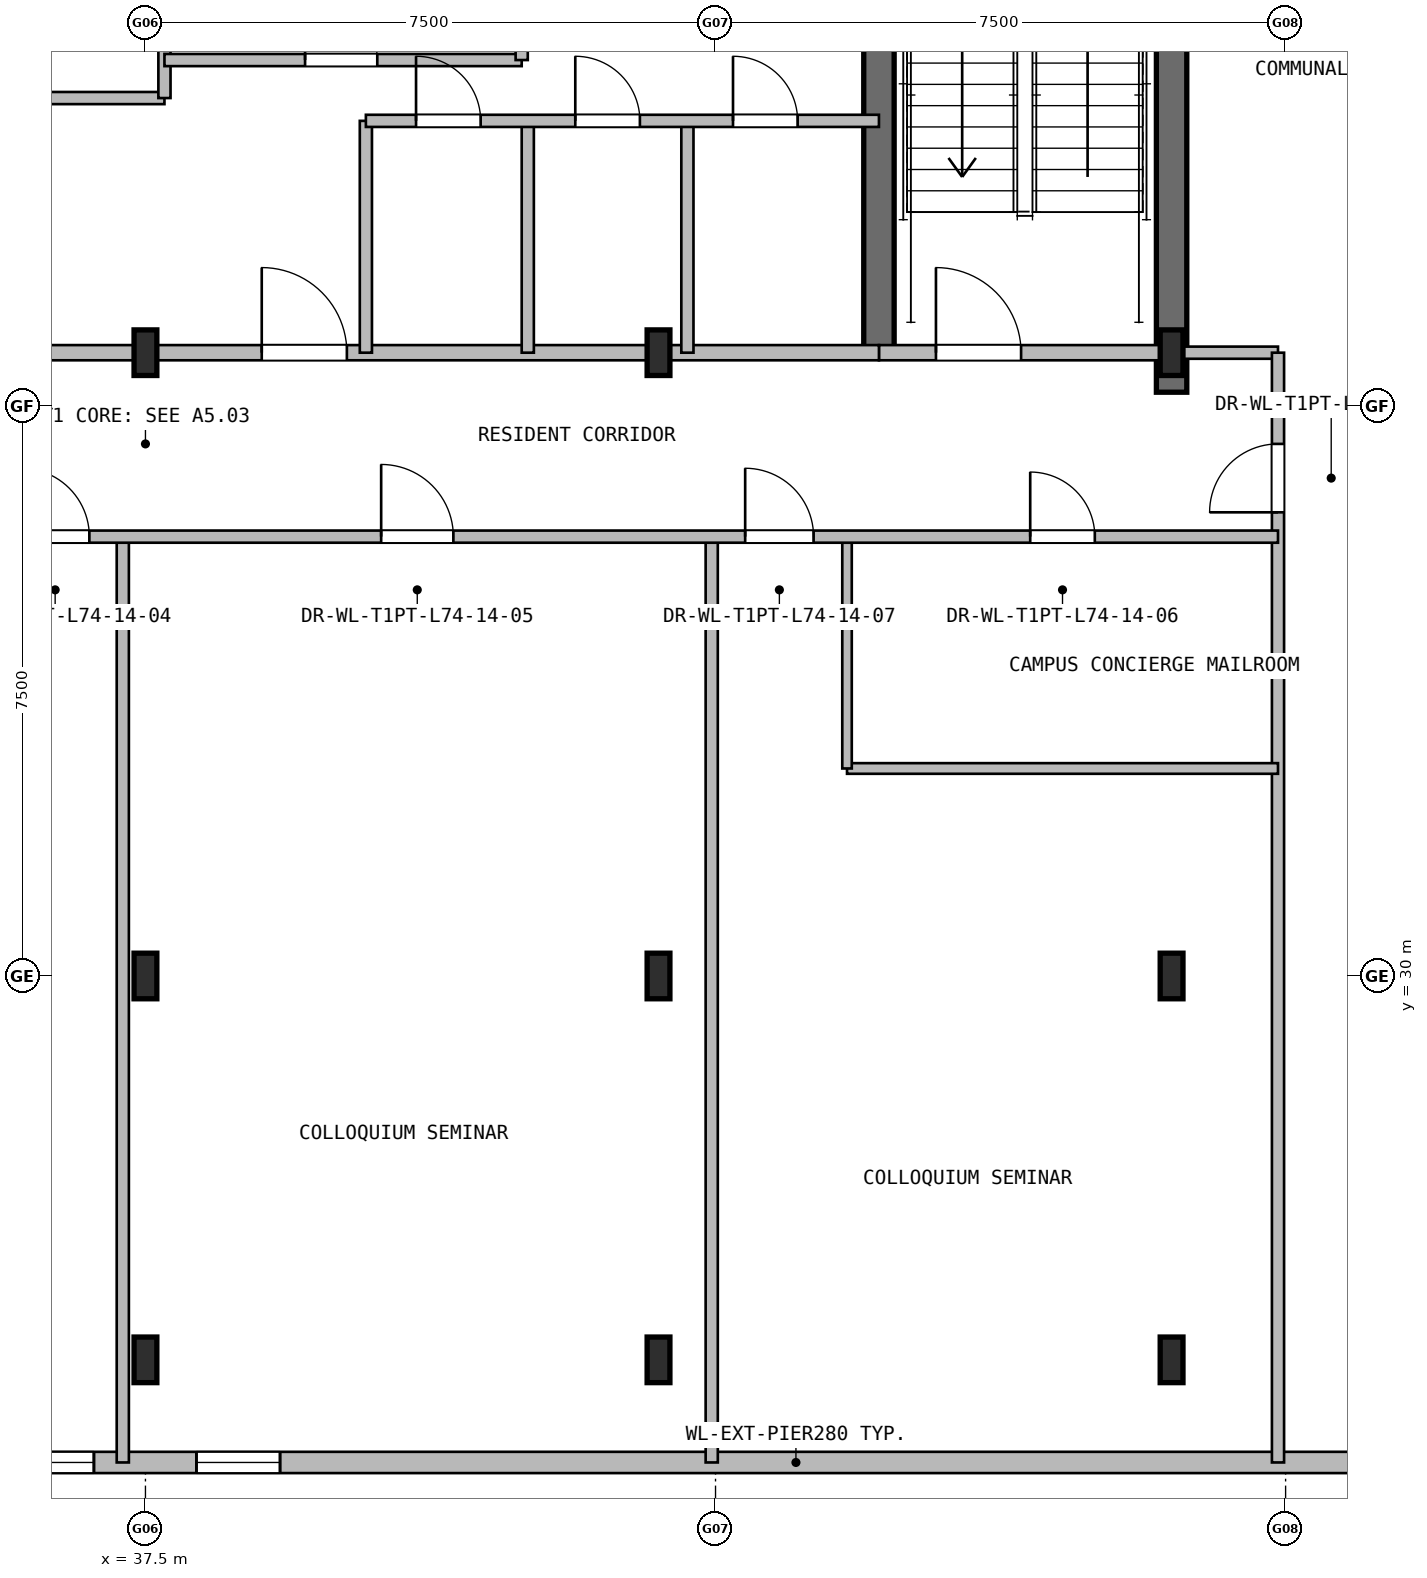
"""IFC4 building model, lengths in metres.
Left out: names, types, materials, properties, quantities, classifications, styles, units other than length and angle.
Written with IfcOpenShell. Run it as: python <this file> out.ifc"""

import sys

from ifc_helpers import new_model, si_unit, direction, frame, frame_2d, origin, origin_2d, place, context, subcontext, project, spatial, rectangle, i_section, extrude, element, fill, save


model = new_model("IFC4")
c1 = context("Model", 3, precision=1e-05, world=origin(), true_north=direction((0.0, 1.0)))
c2 = subcontext(c1, "Body", "Model", "MODEL_VIEW")
j1 = project(units=[si_unit("LENGTHUNIT", "METRE"), si_unit("PLANEANGLEUNIT", "RADIAN")], contexts=[c1])
p1 = place(None, origin())
s1 = spatial("IfcSite", under=j1, at=p1, CompositionType="ELEMENT")
p2 = place(p1, origin())
s2 = spatial("IfcBuilding", under=s1, at=p2, CompositionType="ELEMENT")
p3 = place(p2, frame((0.0, 0.0, 265.8)))
s3 = spatial("IfcBuildingStorey", under=s2, at=p3, CompositionType="ELEMENT", Elevation=265.8)
p4 = place(p3, frame((51.0, 37.68, 0.0), z_axis=(0.0, 0.0, 1.0), x_axis=(0.0, 1.0, 0.0)))
e1 = element("IfcWall", 1, at=p4, inside=s3, PredefinedType="SHEAR", context=c2, shape_type="SweptSolid", body=[
    extrude(rectangle(XDim=10.32, YDim=0.4, at=frame_2d((5.16, 0.0))), origin(), (0.0, 0.0, 1.0), 4.2),
])
p5 = place(p3, frame((47.15, 38.2, 0.0), z_axis=(0.0, 0.0, 1.0), x_axis=(0.0, 1.0, 0.0)))
e2 = element("IfcWall", 2, at=p5, inside=s3, PredefinedType="SHEAR", context=c2, shape_type="SweptSolid", body=[
    extrude(rectangle(XDim=9.8, YDim=0.4, at=frame_2d((4.9, 0.0))), origin(), (0.0, 0.0, 1.0), 4.2),
])
for number, where, z_axis, x_axis in (
    (3, (37.5, 24.95, 0.0), (0.0, 0.0, 1.0), (1.0, 0.0, 0.0)),
    (4, (37.5, 30.0, 0.0), (0.0, 0.0, 1.0), (1.0, 0.0, 0.0)),
    (5, (37.5, 38.2, 0.0), (0.0, 0.0, 1.0), (1.0, 0.0, 0.0)),
    (6, (44.25, 24.95, 0.0), (0.0, 0.0, 1.0), (1.0, 0.0, 0.0)),
    (7, (44.25, 30.0, 0.0), (0.0, 0.0, 1.0), (1.0, 0.0, 0.0)),
    (8, (44.25, 38.2, 0.0), (0.0, 0.0, 1.0), (1.0, 0.0, 0.0)),
    (9, (51.0, 24.95, 0.0), (0.0, 0.0, 1.0), (1.0, 0.0, 0.0)),
    (10, (51.0, 30.0, 0.0), (0.0, 0.0, 1.0), (1.0, 0.0, 0.0)),
    (11, (51.0, 38.2, 0.0), (0.0, 0.0, 1.0), (1.0, 0.0, 0.0)),
):
    element("IfcColumn", number, at=place(p3, frame(where, z_axis=z_axis, x_axis=x_axis)), inside=s3, PredefinedType="COLUMN", context=c2, shape_type="SweptSolid", body=[
        extrude(i_section(OverallWidth=0.3, OverallDepth=0.6, WebThickness=0.014, FlangeThickness=0.025, at=origin_2d()), origin(), (0.0, 0.0, 1.0), 4.2),
    ])
p6 = place(p3, frame((54.55, 23.6, 0.0), z_axis=(0.0, 0.0, 1.0), x_axis=(-1.0, 0.0, 0.0)))
e12 = element("IfcWall", 12, at=p6, inside=s3, PredefinedType="SOLIDWALL", context=c2, shape_type="SweptSolid", body=[
    extrude(rectangle(XDim=34.1, YDim=0.28, at=frame_2d((17.05, 0.0))), origin(), (0.0, 0.0, 1.0), 3.93),
])
p7 = place(p6, frame((17.728, 0.0, 0.8)))
e13 = element("IfcOpeningElement", 13, at=p7, cuts=e12, PredefinedType="OPENING", context=c2, shape_type="SweptSolid", body=[
    extrude(rectangle(XDim=1.1, YDim=1.5, at=frame_2d((0.55, 0.75))), frame((0.0, 0.15, 0.0), z_axis=(0.0, -1.0, 0.0), x_axis=(1.0, 0.0, 0.0)), (0.0, 0.0, 1.0), 0.3),
])
p8 = place(p6, frame((15.279, 0.0, 0.8)))
e14 = element("IfcOpeningElement", 14, at=p8, cuts=e12, PredefinedType="OPENING", context=c2, shape_type="SweptSolid", body=[
    extrude(rectangle(XDim=1.1, YDim=1.5, at=frame_2d((0.55, 0.75))), frame((0.0, 0.15, 0.0), z_axis=(0.0, -1.0, 0.0), x_axis=(1.0, 0.0, 0.0)), (0.0, 0.0, 1.0), 0.3),
])
p9 = place(p3, frame((47.15, 38.2, 0.0), z_axis=(0.0, 0.0, 1.0), x_axis=(1.0, 0.0, 0.0)))
e15 = element("IfcWall", 15, at=p9, inside=s3, PredefinedType="PARTITIONING", context=c2, shape_type="SweptSolid", body=[
    extrude(rectangle(XDim=3.85, YDim=0.2, at=frame_2d((1.925, 0.0))), origin(), (0.0, 0.0, 1.0), 3.33),
])
p10 = place(p9, frame((0.75, 0.0, 0.0)))
e16 = element("IfcOpeningElement", 16, at=p10, cuts=e15, PredefinedType="OPENING", context=c2, shape_type="SweptSolid", body=[
    extrude(rectangle(XDim=1.12, YDim=2.1, at=frame_2d((0.56, 1.05))), frame((0.0, 0.11, 0.0), z_axis=(0.0, -1.0, 0.0), x_axis=(1.0, 0.0, 0.0)), (0.0, 0.0, 1.0), 0.22),
])
p11 = place(p3, frame((30.8, 38.2, 0.0), z_axis=(0.0, 0.0, 1.0), x_axis=(1.0, 0.0, 0.0)))
e17 = element("IfcWall", 17, at=p11, inside=s3, PredefinedType="PARTITIONING", context=c2, shape_type="SweptSolid", body=[
    extrude(rectangle(XDim=16.35, YDim=0.2, at=frame_2d((8.175, 0.0))), origin(), (0.0, 0.0, 1.0), 3.33),
])
p12 = place(p11, frame((2.95, 0.0, 0.0)))
e18 = element("IfcOpeningElement", 18, at=p12, cuts=e17, PredefinedType="OPENING", context=c2, shape_type="SweptSolid", body=[
    extrude(rectangle(XDim=1.12, YDim=2.1, at=frame_2d((0.56, 1.05))), frame((0.0, 0.11, 0.0), z_axis=(0.0, -1.0, 0.0), x_axis=(1.0, 0.0, 0.0)), (0.0, 0.0, 1.0), 0.22),
])
p13 = place(p11, frame((8.23, 0.0, 0.0)))
e19 = element("IfcOpeningElement", 19, at=p13, cuts=e17, PredefinedType="OPENING", context=c2, shape_type="SweptSolid", body=[
    extrude(rectangle(XDim=1.12, YDim=2.1, at=frame_2d((0.56, 1.05))), frame((0.0, 0.11, 0.0), z_axis=(0.0, -1.0, 0.0), x_axis=(1.0, 0.0, 0.0)), (0.0, 0.0, 1.0), 0.22),
])
p14 = place(p3, frame((30.8, 41.55, 0.0), z_axis=(0.0, 0.0, 1.0), x_axis=(1.0, 0.0, 0.0)))
e20 = element("IfcWall", 20, at=p14, inside=s3, PredefinedType="PARTITIONING", context=c2, shape_type="SweptSolid", body=[
    extrude(rectangle(XDim=6.95, YDim=0.16, at=frame_2d((3.475, 0.0))), origin(), (0.0, 0.0, 1.0), 3.93),
])
p15 = place(p14, frame((4.2, 0.0, 0.0)))
e21 = element("IfcOpeningElement", 21, at=p15, cuts=e20, PredefinedType="OPENING", context=c2, shape_type="SweptSolid", body=[
    extrude(rectangle(XDim=0.95, YDim=2.1, at=frame_2d((0.475, 1.05))), frame((0.0, 0.09, 0.0), z_axis=(0.0, -1.0, 0.0), x_axis=(1.0, 0.0, 0.0)), (0.0, 0.0, 1.0), 0.18),
])
p16 = place(p3, frame((37.75, 41.55, 0.0), z_axis=(0.0, 0.0, 1.0), x_axis=(0.0, 1.0, 0.0)))
e22 = element("IfcWall", 22, at=p16, inside=s3, PredefinedType="PARTITIONING", context=c2, shape_type="SweptSolid", body=[
    extrude(rectangle(XDim=6.35, YDim=0.16, at=frame_2d((3.175, 0.0))), origin(), (0.0, 0.0, 1.0), 3.93),
])
p17 = place(p3, frame((37.75, 42.05, 0.0), z_axis=(0.0, 0.0, 1.0), x_axis=(1.0, 0.0, 0.0)))
e23 = element("IfcWall", 23, at=p17, inside=s3, PredefinedType="PARTITIONING", context=c2, shape_type="SweptSolid", body=[
    extrude(rectangle(XDim=4.7, YDim=0.16, at=frame_2d((2.35, 0.0))), origin(), (0.0, 0.0, 1.0), 3.93),
])
p18 = place(p17, frame((1.85, 0.0, 0.0)))
e24 = element("IfcOpeningElement", 24, at=p18, cuts=e23, PredefinedType="OPENING", context=c2, shape_type="SweptSolid", body=[
    extrude(rectangle(XDim=0.95, YDim=2.1, at=frame_2d((0.475, 1.05))), frame((0.0, 0.09, 0.0), z_axis=(0.0, -1.0, 0.0), x_axis=(1.0, 0.0, 0.0)), (0.0, 0.0, 1.0), 0.18),
])
p19 = place(p3, frame((42.45, 42.05, 0.0), z_axis=(0.0, 0.0, 1.0), x_axis=(0.0, 1.0, 0.0)))
e25 = element("IfcWall", 25, at=p19, inside=s3, PredefinedType="PARTITIONING", context=c2, shape_type="SweptSolid", body=[
    extrude(rectangle(XDim=2.7, YDim=0.16, at=frame_2d((1.35, 0.0))), origin(), (0.0, 0.0, 1.0), 3.93),
])
for number, where, z_axis, x_axis in (
    (26, (40.4, 38.2, 0.0), (0.0, 0.0, 1.0), (0.0, 1.0, 0.0)),
    (27, (42.53, 38.2, 0.0), (0.0, 0.0, 1.0), (0.0, 1.0, 0.0)),
    (28, (44.63, 38.2, 0.0), (0.0, 0.0, 1.0), (0.0, 1.0, 0.0)),
):
    element("IfcWall", number, at=place(p3, frame(where, z_axis=z_axis, x_axis=x_axis)), inside=s3, PredefinedType="PARTITIONING", context=c2, shape_type="SweptSolid", body=[
        extrude(rectangle(XDim=3.05, YDim=0.16, at=frame_2d((1.525, 0.0))), origin(), (0.0, 0.0, 1.0), 3.93),
    ])
p20 = place(p3, frame((40.4, 41.25, 0.0), z_axis=(0.0, 0.0, 1.0), x_axis=(1.0, 0.0, 0.0)))
e29 = element("IfcWall", 29, at=p20, inside=s3, PredefinedType="PARTITIONING", context=c2, shape_type="SweptSolid", body=[
    extrude(rectangle(XDim=6.75, YDim=0.16, at=frame_2d((3.375, 0.0))), origin(), (0.0, 0.0, 1.0), 3.93),
])
p21 = place(p20, frame((0.66, 0.0, 0.0)))
e30 = element("IfcOpeningElement", 30, at=p21, cuts=e29, PredefinedType="OPENING", context=c2, shape_type="SweptSolid", body=[
    extrude(rectangle(XDim=0.85, YDim=2.05, at=frame_2d((0.425, 1.025))), frame((0.0, 0.09, 0.0), z_axis=(0.0, -1.0, 0.0), x_axis=(1.0, 0.0, 0.0)), (0.0, 0.0, 1.0), 0.18),
])
p22 = place(p20, frame((2.755, 0.0, 0.0)))
e31 = element("IfcOpeningElement", 31, at=p22, cuts=e29, PredefinedType="OPENING", context=c2, shape_type="SweptSolid", body=[
    extrude(rectangle(XDim=0.85, YDim=2.05, at=frame_2d((0.425, 1.025))), frame((0.0, 0.09, 0.0), z_axis=(0.0, -1.0, 0.0), x_axis=(1.0, 0.0, 0.0)), (0.0, 0.0, 1.0), 0.18),
])
p23 = place(p20, frame((4.83, 0.0, 0.0)))
e32 = element("IfcOpeningElement", 32, at=p23, cuts=e29, PredefinedType="OPENING", context=c2, shape_type="SweptSolid", body=[
    extrude(rectangle(XDim=0.85, YDim=2.05, at=frame_2d((0.425, 1.025))), frame((0.0, 0.09, 0.0), z_axis=(0.0, -1.0, 0.0), x_axis=(1.0, 0.0, 0.0)), (0.0, 0.0, 1.0), 0.18),
])
p24 = place(p3, frame((51.0, 38.2, 0.0), z_axis=(0.0, 0.0, 1.0), x_axis=(1.0, 0.0, 0.0)))
e33 = element("IfcWall", 33, at=p24, inside=s3, PredefinedType="PARTITIONING", context=c2, shape_type="SweptSolid", body=[
    extrude(rectangle(XDim=1.4, YDim=0.16, at=frame_2d((0.7, 0.0))), origin(), (0.0, 0.0, 1.0), 3.33),
])
p25 = place(p3, frame((52.4, 23.6, 0.0), z_axis=(0.0, 0.0, 1.0), x_axis=(0.0, 1.0, 0.0)))
e34 = element("IfcWall", 34, at=p25, inside=s3, PredefinedType="PARTITIONING", context=c2, shape_type="SweptSolid", body=[
    extrude(rectangle(XDim=14.6, YDim=0.16, at=frame_2d((7.3, 0.0))), origin(), (0.0, 0.0, 1.0), 3.93),
])
p26 = place(p25, frame((12.5, 0.0, 0.0)))
e35 = element("IfcOpeningElement", 35, at=p26, cuts=e34, PredefinedType="OPENING", context=c2, shape_type="SweptSolid", body=[
    extrude(rectangle(XDim=0.9, YDim=2.05, at=frame_2d((0.45, 1.025))), frame((0.0, 0.09, 0.0), z_axis=(0.0, -1.0, 0.0), x_axis=(1.0, 0.0, 0.0)), (0.0, 0.0, 1.0), 0.18),
])
for number, where, z_axis, x_axis in (
    (36, (37.202, 23.6, 0.0), (0.0, 0.0, 1.0), (0.0, 1.0, 0.0)),
    (37, (44.95, 23.6, 0.0), (0.0, 0.0, 1.0), (0.0, 1.0, 0.0)),
):
    element("IfcWall", number, at=place(p3, frame(where, z_axis=z_axis, x_axis=x_axis)), inside=s3, PredefinedType="PARTITIONING", context=c2, shape_type="SweptSolid", body=[
        extrude(rectangle(XDim=12.18, YDim=0.16, at=frame_2d((6.09, 0.0))), origin(), (0.0, 0.0, 1.0), 3.93),
    ])
p27 = place(p3, frame((46.73, 32.73, 0.0), z_axis=(0.0, 0.0, 1.0), x_axis=(1.0, 0.0, 0.0)))
e38 = element("IfcWall", 38, at=p27, inside=s3, PredefinedType="PARTITIONING", context=c2, shape_type="SweptSolid", body=[
    extrude(rectangle(XDim=5.67, YDim=0.14, at=frame_2d((2.835, 0.0))), origin(), (0.0, 0.0, 1.0), 3.93),
])
p28 = place(p3, frame((46.73, 32.73, 0.0), z_axis=(0.0, 0.0, 1.0), x_axis=(0.0, 1.0, 0.0)))
e39 = element("IfcWall", 39, at=p28, inside=s3, PredefinedType="PARTITIONING", context=c2, shape_type="SweptSolid", body=[
    extrude(rectangle(XDim=3.05, YDim=0.125, at=frame_2d((1.525, 0.0))), origin(), (0.0, 0.0, 1.0), 3.93),
])
p29 = place(p3, frame((22.6, 35.78, 0.0), z_axis=(0.0, 0.0, 1.0), x_axis=(1.0, 0.0, 0.0)))
e40 = element("IfcWall", 40, at=p29, inside=s3, PredefinedType="PARTITIONING", context=c2, shape_type="SweptSolid", body=[
    extrude(rectangle(XDim=29.8, YDim=0.16, at=frame_2d((14.9, 0.0))), origin(), (0.0, 0.0, 1.0), 3.93),
])
p30 = place(p29, frame((0.8, 0.0, 0.0)))
e41 = element("IfcOpeningElement", 41, at=p30, cuts=e40, PredefinedType="OPENING", context=c2, shape_type="SweptSolid", body=[
    extrude(rectangle(XDim=0.85, YDim=2.05, at=frame_2d((0.425, 1.025))), frame((0.0, 0.09, 0.0), z_axis=(0.0, -1.0, 0.0), x_axis=(1.0, 0.0, 0.0)), (0.0, 0.0, 1.0), 0.18),
])
p31 = place(p29, frame((4.351, 0.0, 0.0)))
e42 = element("IfcOpeningElement", 42, at=p31, cuts=e40, PredefinedType="OPENING", context=c2, shape_type="SweptSolid", body=[
    extrude(rectangle(XDim=0.9, YDim=2.05, at=frame_2d((0.45, 1.025))), frame((0.0, 0.09, 0.0), z_axis=(0.0, -1.0, 0.0), x_axis=(1.0, 0.0, 0.0)), (0.0, 0.0, 1.0), 0.18),
])
p32 = place(p29, frame((9.562, 0.0, 0.0)))
e43 = element("IfcOpeningElement", 43, at=p32, cuts=e40, PredefinedType="OPENING", context=c2, shape_type="SweptSolid", body=[
    extrude(rectangle(XDim=0.85, YDim=2.05, at=frame_2d((0.425, 1.025))), frame((0.0, 0.09, 0.0), z_axis=(0.0, -1.0, 0.0), x_axis=(1.0, 0.0, 0.0)), (0.0, 0.0, 1.0), 0.18),
])
p33 = place(p29, frame((13.262, 0.0, 0.0)))
e44 = element("IfcOpeningElement", 44, at=p33, cuts=e40, PredefinedType="OPENING", context=c2, shape_type="SweptSolid", body=[
    extrude(rectangle(XDim=0.9, YDim=2.05, at=frame_2d((0.45, 1.025))), frame((0.0, 0.09, 0.0), z_axis=(0.0, -1.0, 0.0), x_axis=(1.0, 0.0, 0.0)), (0.0, 0.0, 1.0), 0.18),
])
p34 = place(p29, frame((18.001, 0.0, 0.0)))
e45 = element("IfcOpeningElement", 45, at=p34, cuts=e40, PredefinedType="OPENING", context=c2, shape_type="SweptSolid", body=[
    extrude(rectangle(XDim=0.95, YDim=2.1, at=frame_2d((0.475, 1.05))), frame((0.0, 0.09, 0.0), z_axis=(0.0, -1.0, 0.0), x_axis=(1.0, 0.0, 0.0)), (0.0, 0.0, 1.0), 0.18),
])
p35 = place(p29, frame((26.54, 0.0, 0.0)))
e46 = element("IfcOpeningElement", 46, at=p35, cuts=e40, PredefinedType="OPENING", context=c2, shape_type="SweptSolid", body=[
    extrude(rectangle(XDim=0.85, YDim=2.05, at=frame_2d((0.425, 1.025))), frame((0.0, 0.09, 0.0), z_axis=(0.0, -1.0, 0.0), x_axis=(1.0, 0.0, 0.0)), (0.0, 0.0, 1.0), 0.18),
])
p36 = place(p29, frame((22.79, 0.0, 0.0)))
e47 = element("IfcOpeningElement", 47, at=p36, cuts=e40, PredefinedType="OPENING", context=c2, shape_type="SweptSolid", body=[
    extrude(rectangle(XDim=0.9, YDim=2.05, at=frame_2d((0.45, 1.025))), frame((0.0, 0.09, 0.0), z_axis=(0.0, -1.0, 0.0), x_axis=(1.0, 0.0, 0.0)), (0.0, 0.0, 1.0), 0.18),
])
p37 = place(p7, origin())
e48 = element("IfcWindow", 48, at=p37, inside=s3, PartitioningType="SINGLE_PANEL", PredefinedType="WINDOW", context=c2, shape_type="SweptSolid", body=[
    extrude(rectangle(XDim=1.1, YDim=1.5, at=frame_2d((0.55, 0.75))), frame((0.0, 0.03, 0.0), z_axis=(0.0, -1.0, 0.0), x_axis=(1.0, 0.0, 0.0)), (0.0, 0.0, 1.0), 0.06),
])
fill(e13, e48)
p38 = place(p8, origin())
e49 = element("IfcWindow", 49, at=p38, inside=s3, PartitioningType="SINGLE_PANEL", PredefinedType="WINDOW", context=c2, shape_type="SweptSolid", body=[
    extrude(rectangle(XDim=1.1, YDim=1.5, at=frame_2d((0.55, 0.75))), frame((0.0, 0.03, 0.0), z_axis=(0.0, -1.0, 0.0), x_axis=(1.0, 0.0, 0.0)), (0.0, 0.0, 1.0), 0.06),
])
fill(e14, e49)
p39 = place(p10, origin())
e50 = element("IfcDoor", 50, at=p39, inside=s3, OperationType="SINGLE_SWING_LEFT", PredefinedType="DOOR", context=c2, shape_type="SweptSolid", body=[
    extrude(rectangle(XDim=1.12, YDim=2.1, at=frame_2d((0.56, 1.05))), frame((0.0, 0.025, 0.0), z_axis=(0.0, -1.0, 0.0), x_axis=(1.0, 0.0, 0.0)), (0.0, 0.0, 1.0), 0.05),
])
fill(e16, e50)
p40 = place(p13, origin())
e51 = element("IfcDoor", 51, at=p40, inside=s3, OperationType="SINGLE_SWING_LEFT", PredefinedType="DOOR", context=c2, shape_type="SweptSolid", body=[
    extrude(rectangle(XDim=1.12, YDim=2.1, at=frame_2d((0.56, 1.05))), frame((0.0, 0.025, 0.0), z_axis=(0.0, -1.0, 0.0), x_axis=(1.0, 0.0, 0.0)), (0.0, 0.0, 1.0), 0.05),
])
fill(e19, e51)
p41 = place(p18, origin())
e52 = element("IfcDoor", 52, at=p41, inside=s3, OperationType="SINGLE_SWING_RIGHT", PredefinedType="DOOR", context=c2, shape_type="SweptSolid", body=[
    extrude(rectangle(XDim=0.95, YDim=2.1, at=frame_2d((0.475, 1.05))), frame((0.0, 0.025, 0.0), z_axis=(0.0, -1.0, 0.0), x_axis=(1.0, 0.0, 0.0)), (0.0, 0.0, 1.0), 0.05),
])
fill(e24, e52)
p42 = place(p21, origin())
e53 = element("IfcDoor", 53, at=p42, inside=s3, OperationType="SINGLE_SWING_LEFT", PredefinedType="DOOR", context=c2, shape_type="SweptSolid", body=[
    extrude(rectangle(XDim=0.85, YDim=2.05, at=frame_2d((0.425, 1.025))), frame((0.0, 0.025, 0.0), z_axis=(0.0, -1.0, 0.0), x_axis=(1.0, 0.0, 0.0)), (0.0, 0.0, 1.0), 0.05),
])
fill(e30, e53)
p43 = place(p22, origin())
e54 = element("IfcDoor", 54, at=p43, inside=s3, OperationType="SINGLE_SWING_RIGHT", PredefinedType="DOOR", context=c2, shape_type="SweptSolid", body=[
    extrude(rectangle(XDim=0.85, YDim=2.05, at=frame_2d((0.425, 1.025))), frame((0.0, 0.025, 0.0), z_axis=(0.0, -1.0, 0.0), x_axis=(1.0, 0.0, 0.0)), (0.0, 0.0, 1.0), 0.05),
])
fill(e31, e54)
p44 = place(p23, origin())
e55 = element("IfcDoor", 55, at=p44, inside=s3, OperationType="SINGLE_SWING_LEFT", PredefinedType="DOOR", context=c2, shape_type="SweptSolid", body=[
    extrude(rectangle(XDim=0.85, YDim=2.05, at=frame_2d((0.425, 1.025))), frame((0.0, 0.025, 0.0), z_axis=(0.0, -1.0, 0.0), x_axis=(1.0, 0.0, 0.0)), (0.0, 0.0, 1.0), 0.05),
])
fill(e32, e55)
p45 = place(p26, origin())
e56 = element("IfcDoor", 56, at=p45, inside=s3, OperationType="SINGLE_SWING_LEFT", PredefinedType="DOOR", context=c2, shape_type="SweptSolid", body=[
    extrude(rectangle(XDim=0.9, YDim=2.05, at=frame_2d((0.45, 1.025))), frame((0.0, 0.025, 0.0), z_axis=(0.0, -1.0, 0.0), x_axis=(1.0, 0.0, 0.0)), (0.0, 0.0, 1.0), 0.05),
])
fill(e35, e56)
p46 = place(p33, origin())
e57 = element("IfcDoor", 57, at=p46, inside=s3, OperationType="SINGLE_SWING_LEFT", PredefinedType="DOOR", context=c2, shape_type="SweptSolid", body=[
    extrude(rectangle(XDim=0.9, YDim=2.05, at=frame_2d((0.45, 1.025))), frame((0.0, 0.025, 0.0), z_axis=(0.0, -1.0, 0.0), x_axis=(1.0, 0.0, 0.0)), (0.0, 0.0, 1.0), 0.05),
])
fill(e44, e57)
p47 = place(p34, origin())
e58 = element("IfcDoor", 58, at=p47, inside=s3, OperationType="SINGLE_SWING_RIGHT", PredefinedType="DOOR", context=c2, shape_type="SweptSolid", body=[
    extrude(rectangle(XDim=0.95, YDim=2.1, at=frame_2d((0.475, 1.05))), frame((0.0, 0.025, 0.0), z_axis=(0.0, -1.0, 0.0), x_axis=(1.0, 0.0, 0.0)), (0.0, 0.0, 1.0), 0.05),
])
fill(e45, e58)
p48 = place(p35, origin())
e59 = element("IfcDoor", 59, at=p48, inside=s3, OperationType="SINGLE_SWING_LEFT", PredefinedType="DOOR", context=c2, shape_type="SweptSolid", body=[
    extrude(rectangle(XDim=0.85, YDim=2.05, at=frame_2d((0.425, 1.025))), frame((0.0, 0.025, 0.0), z_axis=(0.0, -1.0, 0.0), x_axis=(1.0, 0.0, 0.0)), (0.0, 0.0, 1.0), 0.05),
])
fill(e46, e59)
p49 = place(p36, origin())
e60 = element("IfcDoor", 60, at=p49, inside=s3, OperationType="SINGLE_SWING_RIGHT", PredefinedType="DOOR", context=c2, shape_type="SweptSolid", body=[
    extrude(rectangle(XDim=0.9, YDim=2.05, at=frame_2d((0.45, 1.025))), frame((0.0, 0.025, 0.0), z_axis=(0.0, -1.0, 0.0), x_axis=(1.0, 0.0, 0.0)), (0.0, 0.0, 1.0), 0.05),
])
fill(e47, e60)
save(model, sys.argv[1])
